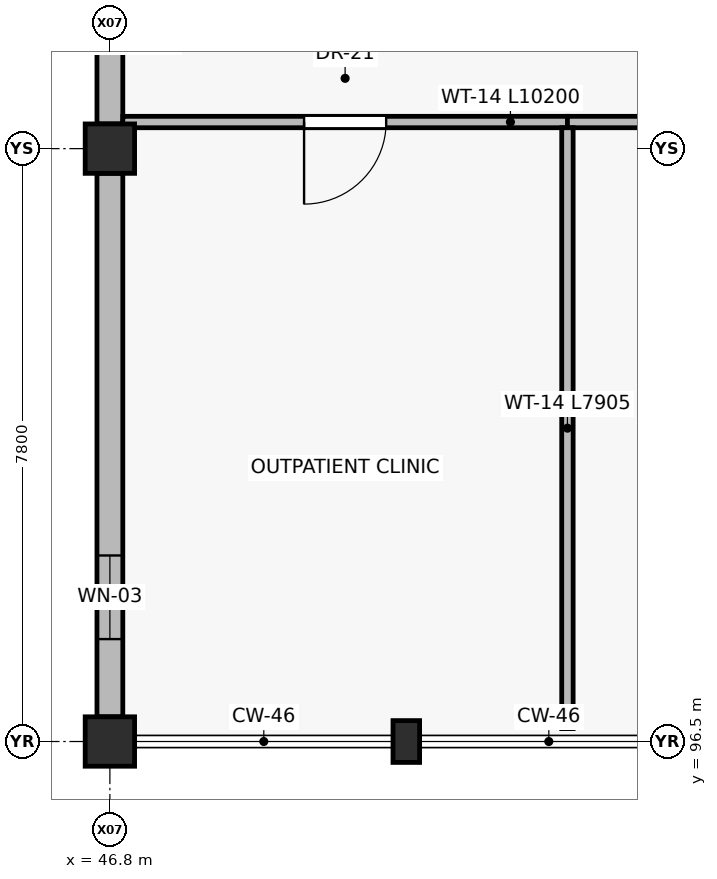
"""IFC4 building model, lengths in metres.
Left out: names, types, materials, properties, quantities, classifications, styles, units other than length and angle.
Written with IfcOpenShell. Run it as: python <this file> out.ifc"""

import sys

from ifc_helpers import new_model, si_unit, direction, frame, frame_2d, origin, origin_2d, place, context, subcontext, project, spatial, rectangle, extrude, element, fill, save


model = new_model("IFC4")
c1 = context("Model", 3, precision=1e-05, world=origin(), true_north=direction((0.0, 1.0)))
c2 = subcontext(c1, "Body", "Model", "MODEL_VIEW")
j1 = project(units=[si_unit("LENGTHUNIT", "METRE"), si_unit("PLANEANGLEUNIT", "RADIAN")], contexts=[c1])
p1 = place(None, origin())
s1 = spatial("IfcSite", under=j1, at=p1, CompositionType="ELEMENT")
p2 = place(p1, origin())
s2 = spatial("IfcBuilding", under=s1, at=p2, CompositionType="ELEMENT")
p3 = place(p2, origin())
s3 = spatial("IfcBuildingStorey", under=s2, at=p3, CompositionType="ELEMENT", Elevation=0.0)
for number, where, z_axis, x_axis in (
    (1, (46.8, 96.5, 0.0), (0.0, 0.0, 1.0), (1.0, 0.0, 0.0)),
    (2, (46.8, 104.3, 0.0), (0.0, 0.0, 1.0), (1.0, 0.0, 0.0)),
):
    element("IfcColumn", number, at=place(p3, frame(where, z_axis=z_axis, x_axis=x_axis)), inside=s3, PredefinedType="COLUMN", context=c2, shape_type="SweptSolid", body=[
        extrude(rectangle(XDim=0.65, YDim=0.65, at=origin_2d()), origin(), (0.0, 0.0, 1.0), 4.8),
    ])
p4 = place(p3, frame((50.7, 96.5, 0.0), z_axis=(0.0, 0.0, 1.0), x_axis=(1.0, 0.0, 0.0)))
e3 = element("IfcColumn", 3, at=p4, inside=s3, PredefinedType="PILASTER", context=c2, shape_type="SweptSolid", body=[
    extrude(rectangle(XDim=0.35, YDim=0.55, at=origin_2d()), origin(), (0.0, 0.0, 1.0), 4.8),
])
p5 = place(p3, frame((46.8, 96.825, 0.0), z_axis=(0.0, 0.0, 1.0), x_axis=(0.0, 1.0, 0.0)))
e4 = element("IfcWall", 4, at=p5, inside=s3, PredefinedType="STANDARD", context=c2, shape_type="SweptSolid", body=[
    extrude(rectangle(XDim=7.15, YDim=0.34, at=frame_2d((3.575, 0.0))), origin(), (0.0, 0.0, 1.0), 4.14),
])
p6 = place(p5, frame((1.022, 0.0, 0.9)))
e5 = element("IfcOpeningElement", 5, at=p6, cuts=e4, PredefinedType="OPENING", context=c2, shape_type="SweptSolid", body=[
    extrude(rectangle(XDim=1.1, YDim=1.6, at=frame_2d((0.55, 0.8))), frame((0.0, 0.18, 0.0), z_axis=(0.0, -1.0, 0.0), x_axis=(1.0, 0.0, 0.0)), (0.0, 0.0, 1.0), 0.36),
])
p7 = place(p3, frame((46.8, 104.625, 0.0), z_axis=(0.0, 0.0, 1.0), x_axis=(0.0, 1.0, 0.0)))
e6 = element("IfcWall", 6, at=p7, inside=s3, PredefinedType="STANDARD", context=c2, shape_type="SweptSolid", body=[
    extrude(rectangle(XDim=3.25, YDim=0.34, at=frame_2d((1.625, 0.0))), origin(), (0.0, 0.0, 1.0), 4.14),
])
p8 = place(p7, frame((1.1, 0.0, 0.9)))
e7 = element("IfcOpeningElement", 7, at=p8, cuts=e6, PredefinedType="OPENING", context=c2, shape_type="SweptSolid", body=[
    extrude(rectangle(XDim=1.05, YDim=1.65, at=frame_2d((0.525, 0.825))), frame((0.0, 0.18, 0.0), z_axis=(0.0, -1.0, 0.0), x_axis=(1.0, 0.0, 0.0)), (0.0, 0.0, 1.0), 0.36),
])
p9 = place(p3, frame((52.82, 104.65, 0.0), z_axis=(0.0, 0.0, 1.0), x_axis=(-1.0, 0.0, 0.0)))
e8 = element("IfcWall", 8, at=p9, inside=s3, PredefinedType="PARTITIONING", context=c2, shape_type="SweptSolid", body=[
    extrude(rectangle(XDim=5.85, YDim=0.15, at=frame_2d((2.925, 0.0))), origin(), (0.0, 0.0, 1.0), 4.04),
])
p10 = place(p9, frame((2.385, 0.0, 0.0)))
e9 = element("IfcOpeningElement", 9, at=p10, cuts=e8, PredefinedType="OPENING", context=c2, shape_type="SweptSolid", body=[
    extrude(rectangle(XDim=1.08, YDim=2.2, at=frame_2d((0.54, 1.1))), frame((0.0, 0.085, 0.0), z_axis=(0.0, -1.0, 0.0), x_axis=(1.0, 0.0, 0.0)), (0.0, 0.0, 1.0), 0.17),
])
p11 = place(p3, frame((57.17, 104.65, 0.0), z_axis=(0.0, 0.0, 1.0), x_axis=(-1.0, 0.0, 0.0)))
e10 = element("IfcWall", 10, at=p11, inside=s3, PredefinedType="PARTITIONING", context=c2, shape_type="SweptSolid", body=[
    extrude(rectangle(XDim=4.35, YDim=0.15, at=frame_2d((2.175, 0.0))), origin(), (0.0, 0.0, 1.0), 4.04),
])
p12 = place(p11, frame((0.448, 0.0, 0.0)))
e11 = element("IfcOpeningElement", 11, at=p12, cuts=e10, PredefinedType="OPENING", context=c2, shape_type="SweptSolid", body=[
    extrude(rectangle(XDim=1.28, YDim=2.25, at=frame_2d((0.64, 1.125))), frame((0.0, 0.085, 0.0), z_axis=(0.0, -1.0, 0.0), x_axis=(1.0, 0.0, 0.0)), (0.0, 0.0, 1.0), 0.17),
])
p13 = place(p3, frame((52.82, 96.67, 0.0), z_axis=(0.0, 0.0, 1.0), x_axis=(0.0, 1.0, 0.0)))
e12 = element("IfcWall", 12, at=p13, inside=s3, PredefinedType="PARTITIONING", context=c2, shape_type="SweptSolid", body=[
    extrude(rectangle(XDim=7.905, YDim=0.15, at=frame_2d((3.953, 0.0))), origin(), (0.0, 0.0, 1.0), 4.54),
])
p14 = place(p6, origin())
e13 = element("IfcWindow", 13, at=p14, inside=s3, PartitioningType="SINGLE_PANEL", PredefinedType="WINDOW", context=c2, shape_type="SweptSolid", body=[
    extrude(rectangle(XDim=1.1, YDim=1.6, at=frame_2d((0.55, 0.8))), frame((0.0, 0.03, 0.0), z_axis=(0.0, -1.0, 0.0), x_axis=(1.0, 0.0, 0.0)), (0.0, 0.0, 1.0), 0.06),
])
fill(e5, e13)
p15 = place(p10, origin())
e14 = element("IfcDoor", 14, at=p15, inside=s3, OperationType="SINGLE_SWING_RIGHT", PredefinedType="DOOR", context=c2, shape_type="SweptSolid", body=[
    extrude(rectangle(XDim=1.08, YDim=2.2, at=frame_2d((0.54, 1.1))), frame((0.0, 0.025, 0.0), z_axis=(0.0, -1.0, 0.0), x_axis=(1.0, 0.0, 0.0)), (0.0, 0.0, 1.0), 0.05),
])
fill(e9, e14)
save(model, sys.argv[1])
